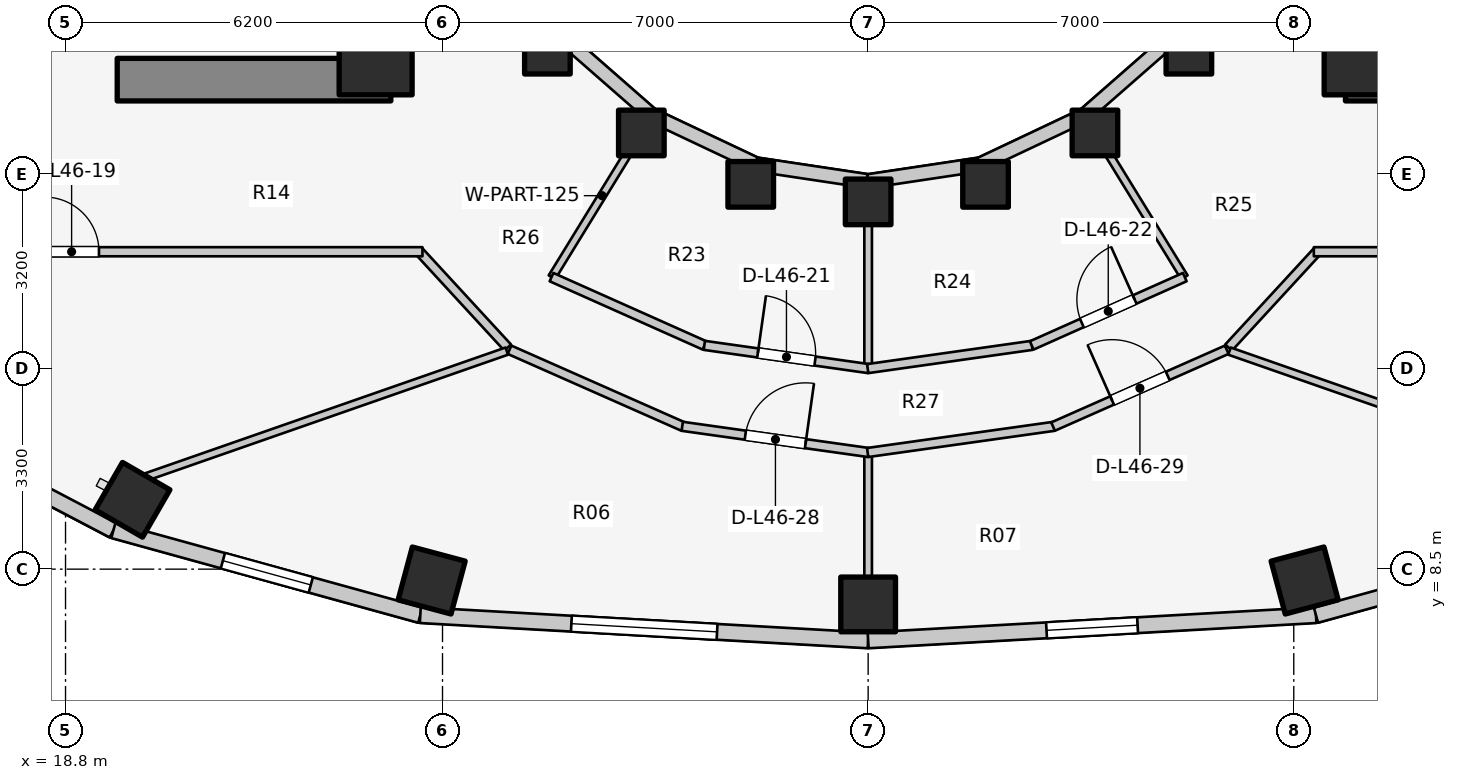
"""IFC4 building model, lengths in metres.
Left out: names, types, materials, properties, quantities, classifications, styles, units other than length and angle.
Written with IfcOpenShell. Run it as: python <this file> out.ifc"""

import sys

from ifc_helpers import new_model, si_unit, direction, frame, frame_2d, origin, origin_2d, place, context, subcontext, project, spatial, rectangle, extrude, element, fill, save


model = new_model("IFC4")
c1 = context("Model", 3, precision=1e-05, world=origin(), true_north=direction((0.0, 1.0)))
c2 = subcontext(c1, "Body", "Model", "MODEL_VIEW")
j1 = project(units=[si_unit("LENGTHUNIT", "METRE"), si_unit("PLANEANGLEUNIT", "RADIAN")], contexts=[c1])
p1 = place(None, origin())
s1 = spatial("IfcSite", under=j1, at=p1, CompositionType="ELEMENT")
p2 = place(p1, origin())
s2 = spatial("IfcBuilding", under=s1, at=p2, CompositionType="ELEMENT")
p3 = place(p2, frame((0.0, 0.0, 152.9)))
s3 = spatial("IfcBuildingStorey", under=s2, at=p3, CompositionType="ELEMENT", Elevation=152.9)
for number, where, z_axis, x_axis in (
    (1, (19.65, 16.55, 0.0), (0.0, 0.0, 1.0), (1.0, 0.0, 0.0)),
    (2, (39.85, 16.55, 0.0), (0.0, 0.0, 1.0), (1.0, 0.0, 0.0)),
):
    element("IfcWall", number, at=place(p3, frame(where, z_axis=z_axis, x_axis=x_axis)), inside=s3, PredefinedType="SHEAR", context=c2, shape_type="SweptSolid", body=[
        extrude(rectangle(XDim=4.5, YDim=0.7, at=frame_2d((2.25, 0.0))), origin(), (0.0, 0.0, 1.0), 3.1),
    ])
for number, where, z_axis, x_axis in (
    (3, (23.9, 16.9, 0.0), (0.0, 0.0, 1.0), (1.0, 0.0, 0.0)),
    (4, (40.1, 16.9, 0.0), (0.0, 0.0, 1.0), (1.0, 0.0, 0.0)),
):
    element("IfcColumn", number, at=place(p3, frame(where, z_axis=z_axis, x_axis=x_axis)), inside=s3, PredefinedType="COLUMN", context=c2, shape_type="SweptSolid", body=[
        extrude(rectangle(XDim=1.2, YDim=1.2, at=origin_2d()), origin(), (0.0, 0.0, 1.0), 3.1),
    ])
for number, where, z_axis, x_axis in (
    (5, (26.725, 17.018, 0.0), (0.0, 0.0, 1.0), (1.0, 0.0, 0.0)),
    (6, (28.27, 15.673, 0.0), (0.0, 0.0, 1.0), (1.0, 0.0, 0.0)),
):
    element("IfcColumn", number, at=place(p3, frame(where, z_axis=z_axis, x_axis=x_axis)), inside=s3, PredefinedType="COLUMN", context=c2, shape_type="SweptSolid", body=[
        extrude(rectangle(XDim=0.75, YDim=0.75, at=origin_2d()), origin(), (0.0, 0.0, 1.0), 3.1),
    ])
p4 = place(p3, frame((19.902, 9.641, 0.0), z_axis=(0.0, 0.0, 1.0), x_axis=(-0.5, -0.866025403784, 0.0)))
e7 = element("IfcColumn", 7, at=p4, inside=s3, PredefinedType="COLUMN", context=c2, shape_type="SweptSolid", body=[
    extrude(rectangle(XDim=0.9, YDim=0.9, at=origin_2d()), origin(), (0.0, 0.0, 1.0), 3.1),
])
p5 = place(p3, frame((30.069, 14.828, 0.0), z_axis=(0.0, 0.0, 1.0), x_axis=(1.0, 0.0, 0.0)))
e8 = element("IfcColumn", 8, at=p5, inside=s3, PredefinedType="COLUMN", context=c2, shape_type="SweptSolid", body=[
    extrude(rectangle(XDim=0.75, YDim=0.75, at=origin_2d()), origin(), (0.0, 0.0, 1.0), 3.1),
])
p6 = place(p3, frame((24.822, 8.313, 0.0), z_axis=(0.0, 0.0, 1.0), x_axis=(-0.258819045103, -0.965925826289, 0.0)))
e9 = element("IfcColumn", 9, at=p6, inside=s3, PredefinedType="COLUMN", context=c2, shape_type="SweptSolid", body=[
    extrude(rectangle(XDim=0.9, YDim=0.9, at=origin_2d()), origin(), (0.0, 0.0, 1.0), 3.1),
])
p7 = place(p3, frame((32.0, 14.54, 0.0), z_axis=(0.0, 0.0, 1.0), x_axis=(1.0, 0.0, 0.0)))
e10 = element("IfcColumn", 10, at=p7, inside=s3, PredefinedType="COLUMN", context=c2, shape_type="SweptSolid", body=[
    extrude(rectangle(XDim=0.75, YDim=0.75, at=origin_2d()), origin(), (0.0, 0.0, 1.0), 3.1),
])
p8 = place(p3, frame((32.0, 7.92, 0.0), z_axis=(0.0, 0.0, 1.0), x_axis=(0.0, -1.0, 0.0)))
e11 = element("IfcColumn", 11, at=p8, inside=s3, PredefinedType="COLUMN", context=c2, shape_type="SweptSolid", body=[
    extrude(rectangle(XDim=0.9, YDim=0.9, at=origin_2d()), origin(), (0.0, 0.0, 1.0), 3.1),
])
p9 = place(p3, frame((33.931, 14.828, 0.0), z_axis=(0.0, 0.0, 1.0), x_axis=(1.0, 0.0, 0.0)))
e12 = element("IfcColumn", 12, at=p9, inside=s3, PredefinedType="COLUMN", context=c2, shape_type="SweptSolid", body=[
    extrude(rectangle(XDim=0.75, YDim=0.75, at=origin_2d()), origin(), (0.0, 0.0, 1.0), 3.1),
])
p10 = place(p3, frame((39.178, 8.313, 0.0), z_axis=(0.0, 0.0, 1.0), x_axis=(0.258819045103, -0.965925826289, 0.0)))
e13 = element("IfcColumn", 13, at=p10, inside=s3, PredefinedType="COLUMN", context=c2, shape_type="SweptSolid", body=[
    extrude(rectangle(XDim=0.9, YDim=0.9, at=origin_2d()), origin(), (0.0, 0.0, 1.0), 3.1),
])
for number, where, z_axis, x_axis in (
    (14, (35.73, 15.673, 0.0), (0.0, 0.0, 1.0), (1.0, 0.0, 0.0)),
    (15, (37.275, 17.018, 0.0), (0.0, 0.0, 1.0), (1.0, 0.0, 0.0)),
):
    element("IfcColumn", number, at=place(p3, frame(where, z_axis=z_axis, x_axis=x_axis)), inside=s3, PredefinedType="COLUMN", context=c2, shape_type="SweptSolid", body=[
        extrude(rectangle(XDim=0.75, YDim=0.75, at=origin_2d()), origin(), (0.0, 0.0, 1.0), 3.1),
    ])
p11 = place(p3, frame((26.965, 17.258, 0.0), z_axis=(0.0, 0.0, 1.0), x_axis=(0.752576694707, -0.658504607869, 0.0)))
e16 = element("IfcWall", 16, at=p11, inside=s3, PredefinedType="STANDARD", context=c2, shape_type="SweptSolid", body=[
    extrude(rectangle(XDim=1.959, YDim=0.23, at=frame_2d((0.98, 0.0))), origin(), (0.0, 0.0, 1.0), 2.16),
])
p12 = place(p3, frame((28.44, 15.968, 0.0), z_axis=(0.0, 0.0, 1.0), x_axis=(0.904179699603, -0.427152280606, 0.0)))
e17 = element("IfcWall", 17, at=p12, inside=s3, PredefinedType="STANDARD", context=c2, shape_type="SweptSolid", body=[
    extrude(rectangle(XDim=1.899, YDim=0.23, at=frame_2d((0.95, 0.0))), origin(), (0.0, 0.0, 1.0), 2.16),
])
for number, where, z_axis, x_axis in (
    (18, (30.157, 15.157, 0.0), (0.0, 0.0, 1.0), (0.989, -0.149, 0.0)),
    (19, (32.0, 14.88, 0.0), (0.0, 0.0, 1.0), (0.989, 0.149, 0.0)),
):
    element("IfcWall", number, at=place(p3, frame(where, z_axis=z_axis, x_axis=x_axis)), inside=s3, PredefinedType="STANDARD", context=c2, shape_type="SweptSolid", body=[
        extrude(rectangle(XDim=1.864, YDim=0.23, at=frame_2d((0.932, 0.0))), origin(), (0.0, 0.0, 1.0), 2.16),
    ])
p13 = place(p3, frame((33.843, 15.157, 0.0), z_axis=(0.0, 0.0, 1.0), x_axis=(0.904179699603, 0.427152280606, 0.0)))
e20 = element("IfcWall", 20, at=p13, inside=s3, PredefinedType="STANDARD", context=c2, shape_type="SweptSolid", body=[
    extrude(rectangle(XDim=1.899, YDim=0.23, at=frame_2d((0.95, 0.0))), origin(), (0.0, 0.0, 1.0), 2.16),
])
p14 = place(p3, frame((35.56, 15.968, 0.0), z_axis=(0.0, 0.0, 1.0), x_axis=(0.752576694707, 0.658504607869, 0.0)))
e21 = element("IfcWall", 21, at=p14, inside=s3, PredefinedType="STANDARD", context=c2, shape_type="SweptSolid", body=[
    extrude(rectangle(XDim=1.959, YDim=0.23, at=frame_2d((0.98, 0.0))), origin(), (0.0, 0.0, 1.0), 2.16),
])
p15 = place(p3, frame((15.731, 11.158, 0.0), z_axis=(0.0, 0.0, 1.0), x_axis=(0.885660265226, -0.464333818065, 0.0)))
e22 = element("IfcWall", 22, at=p15, inside=s3, PredefinedType="STANDARD", context=c2, shape_type="SweptSolid", body=[
    extrude(rectangle(XDim=4.354, YDim=0.26, at=frame_2d((2.177, 0.0))), origin(), (0.0, 0.0, 1.0), 2.85),
])
p16 = place(p3, frame((19.587, 9.137, 0.0), z_axis=(0.0, 0.0, 1.0), x_axis=(0.963953455704, -0.26607092144, 0.0)))
e23 = element("IfcWall", 23, at=p16, inside=s3, PredefinedType="STANDARD", context=c2, shape_type="SweptSolid", body=[
    extrude(rectangle(XDim=5.237, YDim=0.26, at=frame_2d((2.618, 0.0))), origin(), (0.0, 0.0, 1.0), 2.85),
])
p17 = place(p16, frame((1.868, 0.0, 0.75)))
e24 = element("IfcOpeningElement", 24, at=p17, cuts=e23, PredefinedType="OPENING", context=c2, shape_type="SweptSolid", body=[
    extrude(rectangle(XDim=1.5, YDim=1.6, at=frame_2d((0.75, 0.8))), frame((0.0, 0.14, 0.0), z_axis=(0.0, -1.0, 0.0), x_axis=(1.0, 0.0, 0.0)), (0.0, 0.0, 1.0), 0.28),
])
p18 = place(p3, frame((24.635, 7.743, 0.0), z_axis=(0.0, 0.0, 1.0), x_axis=(0.998417906562, -0.056228852534, 0.0)))
e25 = element("IfcWall", 25, at=p18, inside=s3, PredefinedType="STANDARD", context=c2, shape_type="SweptSolid", body=[
    extrude(rectangle(XDim=7.377, YDim=0.26, at=frame_2d((3.688, 0.0))), origin(), (0.0, 0.0, 1.0), 2.85),
])
p19 = place(p18, frame((2.488, 0.0, 0.75)))
e26 = element("IfcOpeningElement", 26, at=p19, cuts=e25, PredefinedType="OPENING", context=c2, shape_type="SweptSolid", body=[
    extrude(rectangle(XDim=2.4, YDim=1.7, at=frame_2d((1.2, 0.85))), frame((0.0, 0.14, 0.0), z_axis=(0.0, -1.0, 0.0), x_axis=(1.0, 0.0, 0.0)), (0.0, 0.0, 1.0), 0.28),
])
p20 = place(p3, frame((32.0, 7.329, 0.0), z_axis=(0.0, 0.0, 1.0), x_axis=(0.998417906562, 0.056228852534, 0.0)))
e27 = element("IfcWall", 27, at=p20, inside=s3, PredefinedType="STANDARD", context=c2, shape_type="SweptSolid", body=[
    extrude(rectangle(XDim=7.377, YDim=0.26, at=frame_2d((3.688, 0.0))), origin(), (0.0, 0.0, 1.0), 2.85),
])
p21 = place(p20, frame((2.938, 0.0, 0.75)))
e28 = element("IfcOpeningElement", 28, at=p21, cuts=e27, PredefinedType="OPENING", context=c2, shape_type="SweptSolid", body=[
    extrude(rectangle(XDim=1.5, YDim=1.6, at=frame_2d((0.75, 0.8))), frame((0.0, 0.14, 0.0), z_axis=(0.0, -1.0, 0.0), x_axis=(1.0, 0.0, 0.0)), (0.0, 0.0, 1.0), 0.28),
])
p22 = place(p3, frame((39.365, 7.743, 0.0), z_axis=(0.0, 0.0, 1.0), x_axis=(0.963953455704, 0.26607092144, 0.0)))
e29 = element("IfcWall", 29, at=p22, inside=s3, PredefinedType="STANDARD", context=c2, shape_type="SweptSolid", body=[
    extrude(rectangle(XDim=5.237, YDim=0.26, at=frame_2d((2.618, 0.0))), origin(), (0.0, 0.0, 1.0), 2.85),
])
p23 = place(p22, frame((1.868, 0.0, 0.75)))
e30 = element("IfcOpeningElement", 30, at=p23, cuts=e29, PredefinedType="OPENING", context=c2, shape_type="SweptSolid", body=[
    extrude(rectangle(XDim=1.5, YDim=1.6, at=frame_2d((0.75, 0.8))), frame((0.0, 0.14, 0.0), z_axis=(0.0, -1.0, 0.0), x_axis=(1.0, 0.0, 0.0)), (0.0, 0.0, 1.0), 0.28),
])
p24 = place(p3, frame((26.072, 12.144, 0.0), z_axis=(0.0, 0.0, 1.0), x_axis=(-0.677579737957, 0.735449317567, 0.0)))
e31 = element("IfcWall", 31, at=p24, inside=s3, PredefinedType="PARTITIONING", context=c2, shape_type="SweptSolid", body=[
    extrude(rectangle(XDim=2.173, YDim=0.15, at=frame_2d((1.086, 0.0))), origin(), (0.0, 0.0, 1.0), 2.299),
])
p25 = place(p3, frame((17.15, 13.72, 0.0), z_axis=(0.0, 0.0, 1.0), x_axis=(1.0, 0.0, 0.0)))
e32 = element("IfcWall", 32, at=p25, inside=s3, PredefinedType="PARTITIONING", context=c2, shape_type="SweptSolid", body=[
    extrude(rectangle(XDim=7.52, YDim=0.15, at=frame_2d((3.76, 0.0))), origin(), (0.0, 0.0, 1.0), 2.299),
])
p26 = place(p25, frame((1.3, 0.0, 0.0)))
e33 = element("IfcOpeningElement", 33, at=p26, cuts=e32, PredefinedType="OPENING", context=c2, shape_type="SweptSolid", body=[
    extrude(rectangle(XDim=0.9, YDim=2.1, at=frame_2d((0.45, 1.05))), frame((0.0, 0.085, 0.0), z_axis=(0.0, -1.0, 0.0), x_axis=(1.0, 0.0, 0.0)), (0.0, 0.0, 1.0), 0.17),
])
p27 = place(p3, frame((37.928, 12.144, 0.0), z_axis=(0.0, 0.0, 1.0), x_axis=(0.677579737957, 0.735449317567, 0.0)))
e34 = element("IfcWall", 34, at=p27, inside=s3, PredefinedType="PARTITIONING", context=c2, shape_type="SweptSolid", body=[
    extrude(rectangle(XDim=2.173, YDim=0.15, at=frame_2d((1.086, 0.0))), origin(), (0.0, 0.0, 1.0), 2.299),
])
p28 = place(p3, frame((39.33, 13.72, 0.0), z_axis=(0.0, 0.0, 1.0), x_axis=(1.0, 0.0, 0.0)))
e35 = element("IfcWall", 35, at=p28, inside=s3, PredefinedType="PARTITIONING", context=c2, shape_type="SweptSolid", body=[
    extrude(rectangle(XDim=7.52, YDim=0.15, at=frame_2d((3.76, 0.0))), origin(), (0.0, 0.0, 1.0), 2.299),
])
p29 = place(p28, frame((5.22, 0.0, 0.0)))
e36 = element("IfcOpeningElement", 36, at=p29, cuts=e35, PredefinedType="OPENING", context=c2, shape_type="SweptSolid", body=[
    extrude(rectangle(XDim=0.9, YDim=2.1, at=frame_2d((0.45, 1.05))), frame((0.0, 0.085, 0.0), z_axis=(0.0, -1.0, 0.0), x_axis=(1.0, 0.0, 0.0)), (0.0, 0.0, 1.0), 0.17),
])
p30 = place(p3, frame((28.45, 15.985, 0.0), z_axis=(0.0, 0.0, 1.0), x_axis=(-0.523587550846, -0.851971875474, 0.0)))
e37 = element("IfcWall", 37, at=p30, inside=s3, PredefinedType="PARTITIONING", context=c2, shape_type="SweptSolid", body=[
    extrude(rectangle(XDim=3.153, YDim=0.125, at=frame_2d((1.577, 0.0))), origin(), (0.0, 0.0, 1.0), 2.299),
])
p31 = place(p3, frame((32.0, 14.9, 0.0), z_axis=(0.0, 0.0, 1.0), x_axis=(0.0, -1.0, 0.0)))
e38 = element("IfcWall", 38, at=p31, inside=s3, PredefinedType="PARTITIONING", context=c2, shape_type="SweptSolid", body=[
    extrude(rectangle(XDim=3.102, YDim=0.125, at=frame_2d((1.551, 0.0))), origin(), (0.0, 0.0, 1.0), 2.299),
])
p32 = place(p3, frame((35.55, 15.985, 0.0), z_axis=(0.0, 0.0, 1.0), x_axis=(0.523587550846, -0.851971875474, 0.0)))
e39 = element("IfcWall", 39, at=p32, inside=s3, PredefinedType="PARTITIONING", context=c2, shape_type="SweptSolid", body=[
    extrude(rectangle(XDim=3.153, YDim=0.125, at=frame_2d((1.577, 0.0))), origin(), (0.0, 0.0, 1.0), 2.299),
])
p33 = place(p3, frame((26.793, 13.303, 0.0), z_axis=(0.0, 0.0, 1.0), x_axis=(0.913145536541, -0.407633694749, 0.0)))
e40 = element("IfcWall", 40, at=p33, inside=s3, PredefinedType="PARTITIONING", context=c2, shape_type="SweptSolid", body=[
    extrude(rectangle(XDim=2.756, YDim=0.15, at=frame_2d((1.378, 0.0))), origin(), (0.0, 0.0, 1.0), 2.299),
])
p34 = place(p3, frame((29.306, 12.18, 0.0), z_axis=(0.0, 0.0, 1.0), x_axis=(0.990145400278, -0.140043158738, 0.0)))
e41 = element("IfcWall", 41, at=p34, inside=s3, PredefinedType="PARTITIONING", context=c2, shape_type="SweptSolid", body=[
    extrude(rectangle(XDim=2.728, YDim=0.15, at=frame_2d((1.364, 0.0))), origin(), (0.0, 0.0, 1.0), 2.299),
])
p35 = place(p34, frame((0.889, 0.0, 0.0)))
e42 = element("IfcOpeningElement", 42, at=p35, cuts=e41, PredefinedType="OPENING", context=c2, shape_type="SweptSolid", body=[
    extrude(rectangle(XDim=0.95, YDim=2.1, at=frame_2d((0.475, 1.05))), frame((0.0, 0.085, 0.0), z_axis=(0.0, -1.0, 0.0), x_axis=(1.0, 0.0, 0.0)), (0.0, 0.0, 1.0), 0.17),
])
p36 = place(p3, frame((31.993, 11.798, 0.0), z_axis=(0.0, 0.0, 1.0), x_axis=(0.990145400278, 0.140043158738, 0.0)))
e43 = element("IfcWall", 43, at=p36, inside=s3, PredefinedType="PARTITIONING", context=c2, shape_type="SweptSolid", body=[
    extrude(rectangle(XDim=2.728, YDim=0.15, at=frame_2d((1.364, 0.0))), origin(), (0.0, 0.0, 1.0), 2.299),
])
p37 = place(p3, frame((34.69, 12.179, 0.0), z_axis=(0.0, 0.0, 1.0), x_axis=(0.913145536541, 0.407633694749, 0.0)))
e44 = element("IfcWall", 44, at=p37, inside=s3, PredefinedType="PARTITIONING", context=c2, shape_type="SweptSolid", body=[
    extrude(rectangle(XDim=2.756, YDim=0.15, at=frame_2d((1.378, 0.0))), origin(), (0.0, 0.0, 1.0), 2.299),
])
p38 = place(p37, frame((0.903, 0.0, 0.0)))
e45 = element("IfcOpeningElement", 45, at=p38, cuts=e44, PredefinedType="OPENING", context=c2, shape_type="SweptSolid", body=[
    extrude(rectangle(XDim=0.95, YDim=2.1, at=frame_2d((0.475, 1.05))), frame((0.0, 0.085, 0.0), z_axis=(0.0, -1.0, 0.0), x_axis=(1.0, 0.0, 0.0)), (0.0, 0.0, 1.0), 0.17),
])
p39 = place(p3, frame((26.057, 12.086, 0.0), z_axis=(0.0, 0.0, 1.0), x_axis=(-0.944182779284, -0.329422038278, 0.0)))
e46 = element("IfcWall", 46, at=p39, inside=s3, PredefinedType="PARTITIONING", context=c2, shape_type="SweptSolid", body=[
    extrude(rectangle(XDim=6.291, YDim=0.125, at=frame_2d((3.146, 0.0))), origin(), (0.0, 0.0, 1.0), 2.299),
])
p40 = place(p3, frame((32.0, 10.363, 0.0), z_axis=(0.0, 0.0, 1.0), x_axis=(0.0, -1.0, 0.0)))
e47 = element("IfcWall", 47, at=p40, inside=s3, PredefinedType="PARTITIONING", context=c2, shape_type="SweptSolid", body=[
    extrude(rectangle(XDim=2.013, YDim=0.125, at=frame_2d((1.006, 0.0))), origin(), (0.0, 0.0, 1.0), 2.299),
])
p41 = place(p3, frame((37.943, 12.086, 0.0), z_axis=(0.0, 0.0, 1.0), x_axis=(0.944182779284, -0.329422038278, 0.0)))
e48 = element("IfcWall", 48, at=p41, inside=s3, PredefinedType="PARTITIONING", context=c2, shape_type="SweptSolid", body=[
    extrude(rectangle(XDim=6.291, YDim=0.125, at=frame_2d((3.146, 0.0))), origin(), (0.0, 0.0, 1.0), 2.299),
])
p42 = place(p3, frame((26.102, 12.108, 0.0), z_axis=(0.0, 0.0, 1.0), x_axis=(0.914519212393, -0.40454247016, 0.0)))
e49 = element("IfcWall", 49, at=p42, inside=s3, PredefinedType="PARTITIONING", context=c2, shape_type="SweptSolid", body=[
    extrude(rectangle(XDim=3.124, YDim=0.15, at=frame_2d((1.562, 0.0))), origin(), (0.0, 0.0, 1.0), 2.299),
])
p43 = place(p3, frame((28.943, 10.849, 0.0), z_axis=(0.0, 0.0, 1.0), x_axis=(0.990254709652, -0.13926812274, 0.0)))
e50 = element("IfcWall", 50, at=p43, inside=s3, PredefinedType="PARTITIONING", context=c2, shape_type="SweptSolid", body=[
    extrude(rectangle(XDim=3.096, YDim=0.15, at=frame_2d((1.548, 0.0))), origin(), (0.0, 0.0, 1.0), 2.299),
])
p44 = place(p43, frame((1.048, 0.0, 0.0)))
e51 = element("IfcOpeningElement", 51, at=p44, cuts=e50, PredefinedType="OPENING", context=c2, shape_type="SweptSolid", body=[
    extrude(rectangle(XDim=1.0, YDim=2.1, at=frame_2d((0.5, 1.05))), frame((0.0, 0.085, 0.0), z_axis=(0.0, -1.0, 0.0), x_axis=(1.0, 0.0, 0.0)), (0.0, 0.0, 1.0), 0.17),
])
p45 = place(p3, frame((31.992, 10.418, 0.0), z_axis=(0.0, 0.0, 1.0), x_axis=(0.990254709652, 0.13926812274, 0.0)))
e52 = element("IfcWall", 52, at=p45, inside=s3, PredefinedType="PARTITIONING", context=c2, shape_type="SweptSolid", body=[
    extrude(rectangle(XDim=3.096, YDim=0.15, at=frame_2d((1.548, 0.0))), origin(), (0.0, 0.0, 1.0), 2.299),
])
p46 = place(p3, frame((35.042, 10.844, 0.0), z_axis=(0.0, 0.0, 1.0), x_axis=(0.914519212393, 0.40454247016, 0.0)))
e53 = element("IfcWall", 53, at=p46, inside=s3, PredefinedType="PARTITIONING", context=c2, shape_type="SweptSolid", body=[
    extrude(rectangle(XDim=3.124, YDim=0.15, at=frame_2d((1.562, 0.0))), origin(), (0.0, 0.0, 1.0), 2.299),
])
p47 = place(p46, frame((1.062, 0.0, 0.0)))
e54 = element("IfcOpeningElement", 54, at=p47, cuts=e53, PredefinedType="OPENING", context=c2, shape_type="SweptSolid", body=[
    extrude(rectangle(XDim=1.0, YDim=2.1, at=frame_2d((0.5, 1.05))), frame((0.0, 0.085, 0.0), z_axis=(0.0, -1.0, 0.0), x_axis=(1.0, 0.0, 0.0)), (0.0, 0.0, 1.0), 0.17),
])
p48 = place(p17, origin())
e55 = element("IfcWindow", 55, at=p48, inside=s3, PartitioningType="SINGLE_PANEL", PredefinedType="WINDOW", context=c2, shape_type="SweptSolid", body=[
    extrude(rectangle(XDim=1.5, YDim=1.6, at=frame_2d((0.75, 0.8))), frame((0.0, 0.03, 0.0), z_axis=(0.0, -1.0, 0.0), x_axis=(1.0, 0.0, 0.0)), (0.0, 0.0, 1.0), 0.06),
])
fill(e24, e55)
p49 = place(p19, origin())
e56 = element("IfcWindow", 56, at=p49, inside=s3, PartitioningType="SINGLE_PANEL", PredefinedType="WINDOW", context=c2, shape_type="SweptSolid", body=[
    extrude(rectangle(XDim=2.4, YDim=1.7, at=frame_2d((1.2, 0.85))), frame((0.0, 0.03, 0.0), z_axis=(0.0, -1.0, 0.0), x_axis=(1.0, 0.0, 0.0)), (0.0, 0.0, 1.0), 0.06),
])
fill(e26, e56)
p50 = place(p21, origin())
e57 = element("IfcWindow", 57, at=p50, inside=s3, PartitioningType="SINGLE_PANEL", PredefinedType="WINDOW", context=c2, shape_type="SweptSolid", body=[
    extrude(rectangle(XDim=1.5, YDim=1.6, at=frame_2d((0.75, 0.8))), frame((0.0, 0.03, 0.0), z_axis=(0.0, -1.0, 0.0), x_axis=(1.0, 0.0, 0.0)), (0.0, 0.0, 1.0), 0.06),
])
fill(e28, e57)
p51 = place(p26, origin())
e58 = element("IfcDoor", 58, at=p51, inside=s3, OperationType="SINGLE_SWING_LEFT", PredefinedType="DOOR", context=c2, shape_type="SweptSolid", body=[
    extrude(rectangle(XDim=0.9, YDim=2.1, at=frame_2d((0.45, 1.05))), frame((0.0, 0.025, 0.0), z_axis=(0.0, -1.0, 0.0), x_axis=(1.0, 0.0, 0.0)), (0.0, 0.0, 1.0), 0.05),
])
fill(e33, e58)
p52 = place(p35, origin())
e59 = element("IfcDoor", 59, at=p52, inside=s3, OperationType="SINGLE_SWING_LEFT", PredefinedType="DOOR", context=c2, shape_type="SweptSolid", body=[
    extrude(rectangle(XDim=0.95, YDim=2.1, at=frame_2d((0.475, 1.05))), frame((0.0, 0.025, 0.0), z_axis=(0.0, -1.0, 0.0), x_axis=(1.0, 0.0, 0.0)), (0.0, 0.0, 1.0), 0.05),
])
fill(e42, e59)
p53 = place(p38, origin())
e60 = element("IfcDoor", 60, at=p53, inside=s3, OperationType="SINGLE_SWING_RIGHT", PredefinedType="DOOR", context=c2, shape_type="SweptSolid", body=[
    extrude(rectangle(XDim=0.95, YDim=2.1, at=frame_2d((0.475, 1.05))), frame((0.0, 0.025, 0.0), z_axis=(0.0, -1.0, 0.0), x_axis=(1.0, 0.0, 0.0)), (0.0, 0.0, 1.0), 0.05),
])
fill(e45, e60)
p54 = place(p44, origin())
e61 = element("IfcDoor", 61, at=p54, inside=s3, OperationType="SINGLE_SWING_RIGHT", PredefinedType="DOOR", context=c2, shape_type="SweptSolid", body=[
    extrude(rectangle(XDim=1.0, YDim=2.1, at=frame_2d((0.5, 1.05))), frame((0.0, 0.025, 0.0), z_axis=(0.0, -1.0, 0.0), x_axis=(1.0, 0.0, 0.0)), (0.0, 0.0, 1.0), 0.05),
])
fill(e51, e61)
p55 = place(p47, origin())
e62 = element("IfcDoor", 62, at=p55, inside=s3, OperationType="SINGLE_SWING_LEFT", PredefinedType="DOOR", context=c2, shape_type="SweptSolid", body=[
    extrude(rectangle(XDim=1.0, YDim=2.1, at=frame_2d((0.5, 1.05))), frame((0.0, 0.025, 0.0), z_axis=(0.0, -1.0, 0.0), x_axis=(1.0, 0.0, 0.0)), (0.0, 0.0, 1.0), 0.05),
])
fill(e54, e62)
save(model, sys.argv[1])
